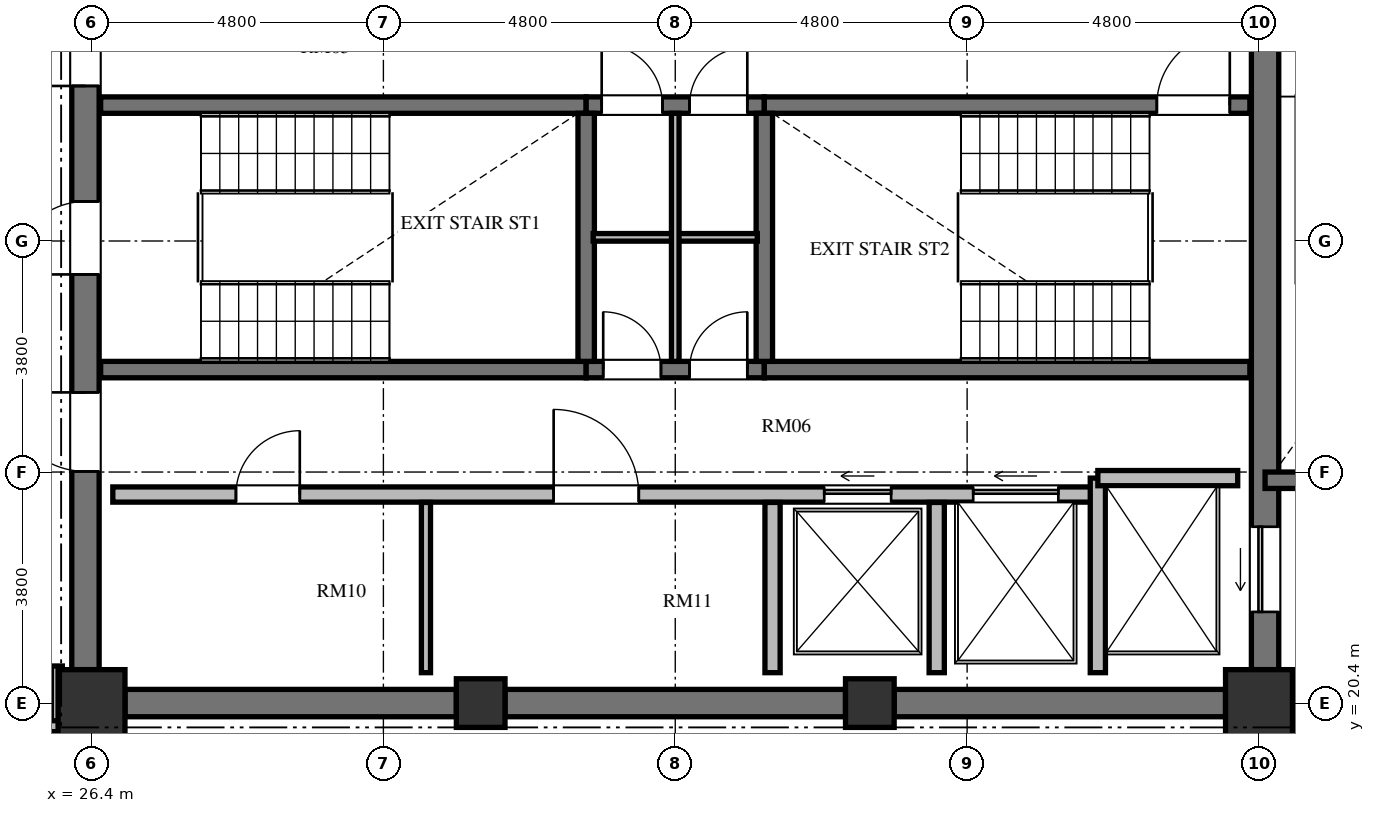
"""IFC4 building model, lengths in metres.
Left out: names, types, materials, properties, quantities, classifications, styles, units other than length and angle.
Written with IfcOpenShell. Run it as: python <this file> out.ifc"""

import sys

from ifc_helpers import new_model, si_unit, direction, frame, frame_2d, origin, origin_2d, place, context, subcontext, project, spatial, rectangle, extrude, element, fill, save


model = new_model("IFC4")
c1 = context("Model", 3, precision=1e-05, world=origin(), true_north=direction((0.0, 1.0)))
c2 = subcontext(c1, "Body", "Model", "MODEL_VIEW")
j1 = project(units=[si_unit("LENGTHUNIT", "METRE"), si_unit("PLANEANGLEUNIT", "RADIAN")], contexts=[c1])
p1 = place(None, origin())
s1 = spatial("IfcSite", under=j1, at=p1, CompositionType="ELEMENT")
p2 = place(p1, origin())
s2 = spatial("IfcBuilding", under=s1, at=p2, CompositionType="ELEMENT")
p3 = place(p2, frame((0.0, 0.0, 258.672)))
s3 = spatial("IfcBuildingStorey", under=s2, at=p3, CompositionType="ELEMENT", Elevation=258.672)
p4 = place(p3, frame((26.4, 20.4, 0.0), z_axis=(0.0, 0.0, 1.0), x_axis=(1.0, 0.0, 0.0)))
e1 = element("IfcColumn", 1, at=p4, inside=s3, PredefinedType="COLUMN", context=c2, shape_type="SweptSolid", body=[
    extrude(rectangle(XDim=1.1, YDim=1.1, at=origin_2d()), origin(), (0.0, 0.0, 1.0), 3.648),
])
for number, where, z_axis, x_axis in (
    (2, (32.8, 20.4, 0.0), (0.0, 0.0, 1.0), (1.0, 0.0, 0.0)),
    (3, (39.2, 20.4, 0.0), (0.0, 0.0, 1.0), (1.0, 0.0, 0.0)),
):
    element("IfcColumn", number, at=place(p3, frame(where, z_axis=z_axis, x_axis=x_axis)), inside=s3, PredefinedType="COLUMN", context=c2, shape_type="SweptSolid", body=[
        extrude(rectangle(XDim=0.8, YDim=0.8, at=origin_2d()), origin(), (0.0, 0.0, 1.0), 3.648),
    ])
p5 = place(p3, frame((45.6, 20.4, 0.0), z_axis=(0.0, 0.0, 1.0), x_axis=(1.0, 0.0, 0.0)))
e4 = element("IfcColumn", 4, at=p5, inside=s3, PredefinedType="COLUMN", context=c2, shape_type="SweptSolid", body=[
    extrude(rectangle(XDim=1.1, YDim=1.1, at=origin_2d()), origin(), (0.0, 0.0, 1.0), 3.648),
])
p6 = place(p3, frame((26.3, 20.95, 0.0), z_axis=(0.0, 0.0, 1.0), x_axis=(0.0, 1.0, 0.0)))
e5 = element("IfcWall", 5, at=p6, inside=s3, PredefinedType="SHEAR", context=c2, shape_type="SweptSolid", body=[
    extrude(rectangle(XDim=14.1, YDim=0.45, at=frame_2d((7.05, 0.0))), origin(), (0.0, 0.0, 1.0), 3.648),
])
p7 = place(p6, frame((6.5, 0.0, 0.0)))
e6 = element("IfcOpeningElement", 6, at=p7, cuts=e5, PredefinedType="OPENING", context=c2, shape_type="SweptSolid", body=[
    extrude(rectangle(XDim=1.2, YDim=2.15, at=frame_2d((0.6, 1.075))), frame((0.0, 0.235, 0.0), z_axis=(0.0, -1.0, 0.0), x_axis=(1.0, 0.0, 0.0)), (0.0, 0.0, 1.0), 0.47),
])
p8 = place(p6, frame((9.6, 0.0, 0.0)))
e7 = element("IfcOpeningElement", 7, at=p8, cuts=e5, PredefinedType="OPENING", context=c2, shape_type="SweptSolid", body=[
    extrude(rectangle(XDim=1.3, YDim=2.2, at=frame_2d((0.65, 1.1))), frame((0.0, 0.235, 0.0), z_axis=(0.0, -1.0, 0.0), x_axis=(1.0, 0.0, 0.0)), (0.0, 0.0, 1.0), 0.47),
])
p9 = place(p6, frame((3.26, 0.0, 0.0)))
e8 = element("IfcOpeningElement", 8, at=p9, cuts=e5, PredefinedType="OPENING", context=c2, shape_type="SweptSolid", body=[
    extrude(rectangle(XDim=1.3, YDim=2.2, at=frame_2d((0.65, 1.1))), frame((0.0, 0.235, 0.0), z_axis=(0.0, -1.0, 0.0), x_axis=(1.0, 0.0, 0.0)), (0.0, 0.0, 1.0), 0.47),
])
p10 = place(p3, frame((45.7, 20.95, 0.0), z_axis=(0.0, 0.0, 1.0), x_axis=(0.0, 1.0, 0.0)))
e9 = element("IfcWall", 9, at=p10, inside=s3, PredefinedType="SHEAR", context=c2, shape_type="SweptSolid", body=[
    extrude(rectangle(XDim=14.1, YDim=0.45, at=frame_2d((7.05, 0.0))), origin(), (0.0, 0.0, 1.0), 3.648),
])
p11 = place(p10, frame((11.75, 0.0, 0.0)))
e10 = element("IfcOpeningElement", 10, at=p11, cuts=e9, PredefinedType="OPENING", context=c2, shape_type="SweptSolid", body=[
    extrude(rectangle(XDim=1.4, YDim=2.3, at=frame_2d((0.7, 1.15))), frame((0.0, 0.235, 0.0), z_axis=(0.0, -1.0, 0.0), x_axis=(1.0, 0.0, 0.0)), (0.0, 0.0, 1.0), 0.47),
])
p12 = place(p10, frame((0.95, 0.0, 0.0)))
e11 = element("IfcOpeningElement", 11, at=p12, cuts=e9, PredefinedType="OPENING", context=c2, shape_type="SweptSolid", body=[
    extrude(rectangle(XDim=1.4, YDim=2.3, at=frame_2d((0.7, 1.15))), frame((0.0, 0.235, 0.0), z_axis=(0.0, -1.0, 0.0), x_axis=(1.0, 0.0, 0.0)), (0.0, 0.0, 1.0), 0.47),
])
p13 = place(p3, frame((26.95, 20.4, 0.0), z_axis=(0.0, 0.0, 1.0), x_axis=(1.0, 0.0, 0.0)))
e12 = element("IfcWall", 12, at=p13, inside=s3, PredefinedType="SHEAR", context=c2, shape_type="SweptSolid", body=[
    extrude(rectangle(XDim=5.45, YDim=0.45, at=frame_2d((2.725, 0.0))), origin(), (0.0, 0.0, 1.0), 3.648),
])
p14 = place(p3, frame((33.2, 20.4, 0.0), z_axis=(0.0, 0.0, 1.0), x_axis=(1.0, 0.0, 0.0)))
e13 = element("IfcWall", 13, at=p14, inside=s3, PredefinedType="SHEAR", context=c2, shape_type="SweptSolid", body=[
    extrude(rectangle(XDim=5.6, YDim=0.45, at=frame_2d((2.8, 0.0))), origin(), (0.0, 0.0, 1.0), 3.648),
])
p15 = place(p3, frame((39.6, 20.4, 0.0), z_axis=(0.0, 0.0, 1.0), x_axis=(1.0, 0.0, 0.0)))
e14 = element("IfcWall", 14, at=p15, inside=s3, PredefinedType="SHEAR", context=c2, shape_type="SweptSolid", body=[
    extrude(rectangle(XDim=5.45, YDim=0.45, at=frame_2d((2.725, 0.0))), origin(), (0.0, 0.0, 1.0), 3.648),
])
p16 = place(p3, frame((26.55, 30.235, 0.0), z_axis=(0.0, 0.0, 1.0), x_axis=(1.0, 0.0, 0.0)))
e15 = element("IfcWall", 15, at=p16, inside=s3, PredefinedType="SHEAR", context=c2, shape_type="SweptSolid", body=[
    extrude(rectangle(XDim=7.985, YDim=0.27, at=frame_2d((3.992, 0.0))), origin(), (0.0, 0.0, 1.0), 3.648),
])
p17 = place(p3, frame((34.535, 30.235, 0.0), z_axis=(0.0, 0.0, 1.0), x_axis=(1.0, 0.0, 0.0)))
e16 = element("IfcWall", 16, at=p17, inside=s3, PredefinedType="SHEAR", context=c2, shape_type="SweptSolid", body=[
    extrude(rectangle(XDim=2.93, YDim=0.27, at=frame_2d((1.465, 0.0))), origin(), (0.0, 0.0, 1.0), 3.648),
])
p18 = place(p17, frame((0.255, 0.0, 0.0)))
e17 = element("IfcOpeningElement", 17, at=p18, cuts=e16, PredefinedType="OPENING", context=c2, shape_type="SweptSolid", body=[
    extrude(rectangle(XDim=1.0, YDim=2.1, at=frame_2d((0.5, 1.05))), frame((0.0, 0.145, 0.0), z_axis=(0.0, -1.0, 0.0), x_axis=(1.0, 0.0, 0.0)), (0.0, 0.0, 1.0), 0.29),
])
p19 = place(p17, frame((1.7, 0.0, 0.0)))
e18 = element("IfcOpeningElement", 18, at=p19, cuts=e16, PredefinedType="OPENING", context=c2, shape_type="SweptSolid", body=[
    extrude(rectangle(XDim=0.95, YDim=2.1, at=frame_2d((0.475, 1.05))), frame((0.0, 0.145, 0.0), z_axis=(0.0, -1.0, 0.0), x_axis=(1.0, 0.0, 0.0)), (0.0, 0.0, 1.0), 0.29),
])
p20 = place(p3, frame((37.465, 30.235, 0.0), z_axis=(0.0, 0.0, 1.0), x_axis=(1.0, 0.0, 0.0)))
e19 = element("IfcWall", 19, at=p20, inside=s3, PredefinedType="SHEAR", context=c2, shape_type="SweptSolid", body=[
    extrude(rectangle(XDim=7.985, YDim=0.27, at=frame_2d((3.992, 0.0))), origin(), (0.0, 0.0, 1.0), 3.648),
])
p21 = place(p20, frame((6.455, 0.0, 0.0)))
e20 = element("IfcOpeningElement", 20, at=p21, cuts=e19, PredefinedType="OPENING", context=c2, shape_type="SweptSolid", body=[
    extrude(rectangle(XDim=1.2, YDim=2.15, at=frame_2d((0.6, 1.075))), frame((0.0, 0.145, 0.0), z_axis=(0.0, -1.0, 0.0), x_axis=(1.0, 0.0, 0.0)), (0.0, 0.0, 1.0), 0.29),
])
p22 = place(p3, frame((26.55, 25.885, 0.0), z_axis=(0.0, 0.0, 1.0), x_axis=(1.0, 0.0, 0.0)))
e21 = element("IfcWall", 21, at=p22, inside=s3, PredefinedType="SHEAR", context=c2, shape_type="SweptSolid", body=[
    extrude(rectangle(XDim=7.985, YDim=0.27, at=frame_2d((3.992, 0.0))), origin(), (0.0, 0.0, 1.0), 3.648),
])
p23 = place(p3, frame((34.535, 25.885, 0.0), z_axis=(0.0, 0.0, 1.0), x_axis=(1.0, 0.0, 0.0)))
e22 = element("IfcWall", 22, at=p23, inside=s3, PredefinedType="SHEAR", context=c2, shape_type="SweptSolid", body=[
    extrude(rectangle(XDim=2.93, YDim=0.27, at=frame_2d((1.465, 0.0))), origin(), (0.0, 0.0, 1.0), 3.648),
])
p24 = place(p23, frame((0.28, 0.0, 0.0)))
e23 = element("IfcOpeningElement", 23, at=p24, cuts=e22, PredefinedType="OPENING", context=c2, shape_type="SweptSolid", body=[
    extrude(rectangle(XDim=0.95, YDim=2.1, at=frame_2d((0.475, 1.05))), frame((0.0, 0.145, 0.0), z_axis=(0.0, -1.0, 0.0), x_axis=(1.0, 0.0, 0.0)), (0.0, 0.0, 1.0), 0.29),
])
p25 = place(p23, frame((1.7, 0.0, 0.0)))
e24 = element("IfcOpeningElement", 24, at=p25, cuts=e22, PredefinedType="OPENING", context=c2, shape_type="SweptSolid", body=[
    extrude(rectangle(XDim=0.95, YDim=2.1, at=frame_2d((0.475, 1.05))), frame((0.0, 0.145, 0.0), z_axis=(0.0, -1.0, 0.0), x_axis=(1.0, 0.0, 0.0)), (0.0, 0.0, 1.0), 0.29),
])
p26 = place(p3, frame((37.465, 25.885, 0.0), z_axis=(0.0, 0.0, 1.0), x_axis=(1.0, 0.0, 0.0)))
e25 = element("IfcWall", 25, at=p26, inside=s3, PredefinedType="SHEAR", context=c2, shape_type="SweptSolid", body=[
    extrude(rectangle(XDim=7.985, YDim=0.27, at=frame_2d((3.992, 0.0))), origin(), (0.0, 0.0, 1.0), 3.648),
])
for number, where, z_axis, x_axis in (
    (26, (34.535, 26.02, 0.0), (0.0, 0.0, 1.0), (0.0, 1.0, 0.0)),
    (27, (37.465, 26.02, 0.0), (0.0, 0.0, 1.0), (0.0, 1.0, 0.0)),
):
    element("IfcWall", number, at=place(p3, frame(where, z_axis=z_axis, x_axis=x_axis)), inside=s3, PredefinedType="SHEAR", context=c2, shape_type="SweptSolid", body=[
        extrude(rectangle(XDim=4.08, YDim=0.27, at=frame_2d((2.04, 0.0))), origin(), (0.0, 0.0, 1.0), 3.648),
    ])
p27 = place(p3, frame((34.65, 28.06, 0.0), z_axis=(0.0, 0.0, 1.0), x_axis=(1.0, 0.0, 0.0)))
e28 = element("IfcWall", 28, at=p27, inside=s3, PredefinedType="PARTITIONING", context=c2, shape_type="SweptSolid", body=[
    extrude(rectangle(XDim=2.7, YDim=0.125, at=frame_2d((1.35, 0.0))), origin(), (0.0, 0.0, 1.0), 3.448),
])
p28 = place(p3, frame((36.0, 26.02, 0.0), z_axis=(0.0, 0.0, 1.0), x_axis=(0.0, 1.0, 0.0)))
e29 = element("IfcWall", 29, at=p28, inside=s3, PredefinedType="PARTITIONING", context=c2, shape_type="SweptSolid", body=[
    extrude(rectangle(XDim=4.08, YDim=0.125, at=frame_2d((2.04, 0.0))), origin(), (0.0, 0.0, 1.0), 3.448),
])
p29 = place(p3, frame((26.75, 23.83, 0.0), z_axis=(0.0, 0.0, 1.0), x_axis=(1.0, 0.0, 0.0)))
e30 = element("IfcWall", 30, at=p29, inside=s3, PredefinedType="SOLIDWALL", context=c2, shape_type="SweptSolid", body=[
    extrude(rectangle(XDim=16.2, YDim=0.25, at=frame_2d((8.1, 0.0))), origin(), (0.0, 0.0, 1.0), 3.448),
])
p30 = place(p29, frame((2.025, 0.0, 0.0)))
e31 = element("IfcOpeningElement", 31, at=p30, cuts=e30, PredefinedType="OPENING", context=c2, shape_type="SweptSolid", body=[
    extrude(rectangle(XDim=1.05, YDim=2.15, at=frame_2d((0.525, 1.075))), frame((0.0, 0.135, 0.0), z_axis=(0.0, -1.0, 0.0), x_axis=(1.0, 0.0, 0.0)), (0.0, 0.0, 1.0), 0.27),
])
p31 = place(p29, frame((7.25, 0.0, 0.0)))
e32 = element("IfcOpeningElement", 32, at=p31, cuts=e30, PredefinedType="OPENING", context=c2, shape_type="SweptSolid", body=[
    extrude(rectangle(XDim=1.4, YDim=2.2, at=frame_2d((0.7, 1.1))), frame((0.0, 0.135, 0.0), z_axis=(0.0, -1.0, 0.0), x_axis=(1.0, 0.0, 0.0)), (0.0, 0.0, 1.0), 0.27),
])
p32 = place(p29, frame((11.7, 0.0, 0.0)))
e33 = element("IfcOpeningElement", 33, at=p32, cuts=e30, PredefinedType="OPENING", context=c2, shape_type="SweptSolid", body=[
    extrude(rectangle(XDim=1.1, YDim=2.2, at=frame_2d((0.55, 1.1))), frame((0.0, 0.135, 0.0), z_axis=(0.0, -1.0, 0.0), x_axis=(1.0, 0.0, 0.0)), (0.0, 0.0, 1.0), 0.27),
])
p33 = place(p29, frame((14.15, 0.0, 0.0)))
e34 = element("IfcOpeningElement", 34, at=p33, cuts=e30, PredefinedType="OPENING", context=c2, shape_type="SweptSolid", body=[
    extrude(rectangle(XDim=1.4, YDim=2.3, at=frame_2d((0.7, 1.15))), frame((0.0, 0.135, 0.0), z_axis=(0.0, -1.0, 0.0), x_axis=(1.0, 0.0, 0.0)), (0.0, 0.0, 1.0), 0.27),
])
p34 = place(p3, frame((42.95, 20.9, 0.0), z_axis=(0.0, 0.0, 1.0), x_axis=(0.0, 1.0, 0.0)))
e35 = element("IfcWall", 35, at=p34, inside=s3, PredefinedType="SOLIDWALL", context=c2, shape_type="SweptSolid", body=[
    extrude(rectangle(XDim=3.2, YDim=0.25, at=frame_2d((1.6, 0.0))), origin(), (0.0, 0.0, 1.0), 3.448),
])
p35 = place(p3, frame((42.95, 24.1, 0.0), z_axis=(0.0, 0.0, 1.0), x_axis=(1.0, 0.0, 0.0)))
e36 = element("IfcWall", 36, at=p35, inside=s3, PredefinedType="SOLIDWALL", context=c2, shape_type="SweptSolid", body=[
    extrude(rectangle(XDim=2.3, YDim=0.25, at=frame_2d((1.15, 0.0))), origin(), (0.0, 0.0, 1.0), 3.448),
])
for number, where, z_axis, x_axis in (
    (37, (37.6, 20.9, 0.0), (0.0, 0.0, 1.0), (0.0, 1.0, 0.0)),
    (38, (40.3, 20.9, 0.0), (0.0, 0.0, 1.0), (0.0, 1.0, 0.0)),
):
    element("IfcWall", number, at=place(p3, frame(where, z_axis=z_axis, x_axis=x_axis)), inside=s3, PredefinedType="SOLIDWALL", context=c2, shape_type="SweptSolid", body=[
        extrude(rectangle(XDim=2.8, YDim=0.25, at=frame_2d((1.4, 0.0))), origin(), (0.0, 0.0, 1.0), 3.448),
    ])
p36 = place(p3, frame((31.9, 20.9, 0.0), z_axis=(0.0, 0.0, 1.0), x_axis=(0.0, 1.0, 0.0)))
e39 = element("IfcWall", 39, at=p36, inside=s3, PredefinedType="PARTITIONING", context=c2, shape_type="SweptSolid", body=[
    extrude(rectangle(XDim=2.8, YDim=0.15, at=frame_2d((1.4, 0.0))), origin(), (0.0, 0.0, 1.0), 3.448),
])
p37 = place(p3, frame((45.7, 24.065, 0.0), z_axis=(0.0, 0.0, 1.0), x_axis=(1.0, 0.0, 0.0)))
e40 = element("IfcWall", 40, at=p37, inside=s3, PredefinedType="SHEAR", context=c2, shape_type="SweptSolid", body=[
    extrude(rectangle(XDim=4.715, YDim=0.27, at=frame_2d((2.357, 0.0))), origin(), (0.0, 0.0, 1.0), 3.648),
])
p38 = place(p3, frame((45.7, 20.02, 0.0), z_axis=(0.0, 0.0, 1.0), x_axis=(1.0, 0.0, 0.0)))
e41 = element("IfcWall", 41, at=p38, inside=s3, PredefinedType="SOLIDWALL", context=c2, shape_type="SweptSolid", body=[
    extrude(rectangle(XDim=4.715, YDim=0.25, at=frame_2d((2.357, 0.0))), origin(), (0.0, 0.0, 1.0), 3.448),
])
p39 = place(p3, frame((25.83, 21.01, 0.0), z_axis=(0.0, 0.0, 1.0), x_axis=(0.0, -1.0, 0.0)))
e42 = element("IfcWall", 42, at=p39, inside=s3, PredefinedType="PARTITIONING", context=c2, shape_type="SweptSolid", body=[
    extrude(rectangle(XDim=1.03, YDim=0.18, at=frame_2d((0.515, 0.0))), origin(), (0.0, 0.0, 1.0), 3.448),
])
p40 = place(p3, frame((25.87, 20.02, 0.0), z_axis=(0.0, 0.0, 1.0), x_axis=(-1.0, 0.0, 0.0)))
e43 = element("IfcWall", 43, at=p40, inside=s3, PredefinedType="PARTITIONING", context=c2, shape_type="SweptSolid", body=[
    extrude(rectangle(XDim=2.56, YDim=0.18, at=frame_2d((1.28, 0.0))), origin(), (0.0, 0.0, 1.0), 3.448),
])
p41 = place(p7, origin())
e44 = element("IfcDoor", 44, at=p41, inside=s3, OperationType="SINGLE_SWING_LEFT", PredefinedType="DOOR", context=c2, shape_type="SweptSolid", body=[
    extrude(rectangle(XDim=1.2, YDim=2.15, at=frame_2d((0.6, 1.075))), frame((0.0, 0.025, 0.0), z_axis=(0.0, -1.0, 0.0), x_axis=(1.0, 0.0, 0.0)), (0.0, 0.0, 1.0), 0.05),
])
fill(e6, e44)
p42 = place(p21, origin())
e45 = element("IfcDoor", 45, at=p42, inside=s3, OperationType="SINGLE_SWING_RIGHT", PredefinedType="DOOR", context=c2, shape_type="SweptSolid", body=[
    extrude(rectangle(XDim=1.2, YDim=2.15, at=frame_2d((0.6, 1.075))), frame((0.0, 0.025, 0.0), z_axis=(0.0, -1.0, 0.0), x_axis=(1.0, 0.0, 0.0)), (0.0, 0.0, 1.0), 0.05),
])
fill(e20, e45)
p43 = place(p24, origin())
e46 = element("IfcDoor", 46, at=p43, inside=s3, OperationType="SINGLE_SWING_LEFT", PredefinedType="DOOR", context=c2, shape_type="SweptSolid", body=[
    extrude(rectangle(XDim=0.95, YDim=2.1, at=frame_2d((0.475, 1.05))), frame((0.0, 0.025, 0.0), z_axis=(0.0, -1.0, 0.0), x_axis=(1.0, 0.0, 0.0)), (0.0, 0.0, 1.0), 0.05),
])
fill(e23, e46)
p44 = place(p25, origin())
e47 = element("IfcDoor", 47, at=p44, inside=s3, OperationType="SINGLE_SWING_RIGHT", PredefinedType="DOOR", context=c2, shape_type="SweptSolid", body=[
    extrude(rectangle(XDim=0.95, YDim=2.1, at=frame_2d((0.475, 1.05))), frame((0.0, 0.025, 0.0), z_axis=(0.0, -1.0, 0.0), x_axis=(1.0, 0.0, 0.0)), (0.0, 0.0, 1.0), 0.05),
])
fill(e24, e47)
p45 = place(p18, origin())
e48 = element("IfcDoor", 48, at=p45, inside=s3, OperationType="SINGLE_SWING_LEFT", PredefinedType="DOOR", context=c2, shape_type="SweptSolid", body=[
    extrude(rectangle(XDim=1.0, YDim=2.1, at=frame_2d((0.5, 1.05))), frame((0.0, 0.025, 0.0), z_axis=(0.0, -1.0, 0.0), x_axis=(1.0, 0.0, 0.0)), (0.0, 0.0, 1.0), 0.05),
])
fill(e17, e48)
p46 = place(p19, origin())
e49 = element("IfcDoor", 49, at=p46, inside=s3, OperationType="SINGLE_SWING_RIGHT", PredefinedType="DOOR", context=c2, shape_type="SweptSolid", body=[
    extrude(rectangle(XDim=0.95, YDim=2.1, at=frame_2d((0.475, 1.05))), frame((0.0, 0.025, 0.0), z_axis=(0.0, -1.0, 0.0), x_axis=(1.0, 0.0, 0.0)), (0.0, 0.0, 1.0), 0.05),
])
fill(e18, e49)
p47 = place(p8, origin())
e50 = element("IfcDoor", 50, at=p47, inside=s3, OperationType="SINGLE_SWING_LEFT", PredefinedType="DOOR", context=c2, shape_type="SweptSolid", body=[
    extrude(rectangle(XDim=1.3, YDim=2.2, at=frame_2d((0.65, 1.1))), frame((0.0, 0.025, 0.0), z_axis=(0.0, -1.0, 0.0), x_axis=(1.0, 0.0, 0.0)), (0.0, 0.0, 1.0), 0.05),
])
fill(e7, e50)
p48 = place(p9, origin())
e51 = element("IfcDoor", 51, at=p48, inside=s3, OperationType="SINGLE_SWING_RIGHT", PredefinedType="DOOR", context=c2, shape_type="SweptSolid", body=[
    extrude(rectangle(XDim=1.3, YDim=2.2, at=frame_2d((0.65, 1.1))), frame((0.0, 0.025, 0.0), z_axis=(0.0, -1.0, 0.0), x_axis=(1.0, 0.0, 0.0)), (0.0, 0.0, 1.0), 0.05),
])
fill(e8, e51)
p49 = place(p30, origin())
e52 = element("IfcDoor", 52, at=p49, inside=s3, OperationType="SINGLE_SWING_RIGHT", PredefinedType="DOOR", context=c2, shape_type="SweptSolid", body=[
    extrude(rectangle(XDim=1.05, YDim=2.15, at=frame_2d((0.525, 1.075))), frame((0.0, 0.025, 0.0), z_axis=(0.0, -1.0, 0.0), x_axis=(1.0, 0.0, 0.0)), (0.0, 0.0, 1.0), 0.05),
])
fill(e31, e52)
p50 = place(p31, origin())
e53 = element("IfcDoor", 53, at=p50, inside=s3, OperationType="SINGLE_SWING_LEFT", PredefinedType="DOOR", context=c2, shape_type="SweptSolid", body=[
    extrude(rectangle(XDim=1.4, YDim=2.2, at=frame_2d((0.7, 1.1))), frame((0.0, 0.025, 0.0), z_axis=(0.0, -1.0, 0.0), x_axis=(1.0, 0.0, 0.0)), (0.0, 0.0, 1.0), 0.05),
])
fill(e32, e53)
p51 = place(p32, origin())
e54 = element("IfcDoor", 54, at=p51, inside=s3, OperationType="SLIDING_TO_LEFT", PredefinedType="DOOR", context=c2, shape_type="SweptSolid", body=[
    extrude(rectangle(XDim=1.1, YDim=2.2, at=frame_2d((0.55, 1.1))), frame((0.0, 0.025, 0.0), z_axis=(0.0, -1.0, 0.0), x_axis=(1.0, 0.0, 0.0)), (0.0, 0.0, 1.0), 0.05),
])
fill(e33, e54)
p52 = place(p12, origin())
e55 = element("IfcDoor", 55, at=p52, inside=s3, OperationType="SLIDING_TO_LEFT", PredefinedType="DOOR", context=c2, shape_type="SweptSolid", body=[
    extrude(rectangle(XDim=1.4, YDim=2.3, at=frame_2d((0.7, 1.15))), frame((0.0, 0.025, 0.0), z_axis=(0.0, -1.0, 0.0), x_axis=(1.0, 0.0, 0.0)), (0.0, 0.0, 1.0), 0.05),
])
fill(e11, e55)
p53 = place(p33, origin())
e56 = element("IfcDoor", 56, at=p53, inside=s3, OperationType="SLIDING_TO_LEFT", PredefinedType="DOOR", context=c2, shape_type="SweptSolid", body=[
    extrude(rectangle(XDim=1.4, YDim=2.3, at=frame_2d((0.7, 1.15))), frame((0.0, 0.025, 0.0), z_axis=(0.0, -1.0, 0.0), x_axis=(1.0, 0.0, 0.0)), (0.0, 0.0, 1.0), 0.05),
])
fill(e34, e56)
save(model, sys.argv[1])
